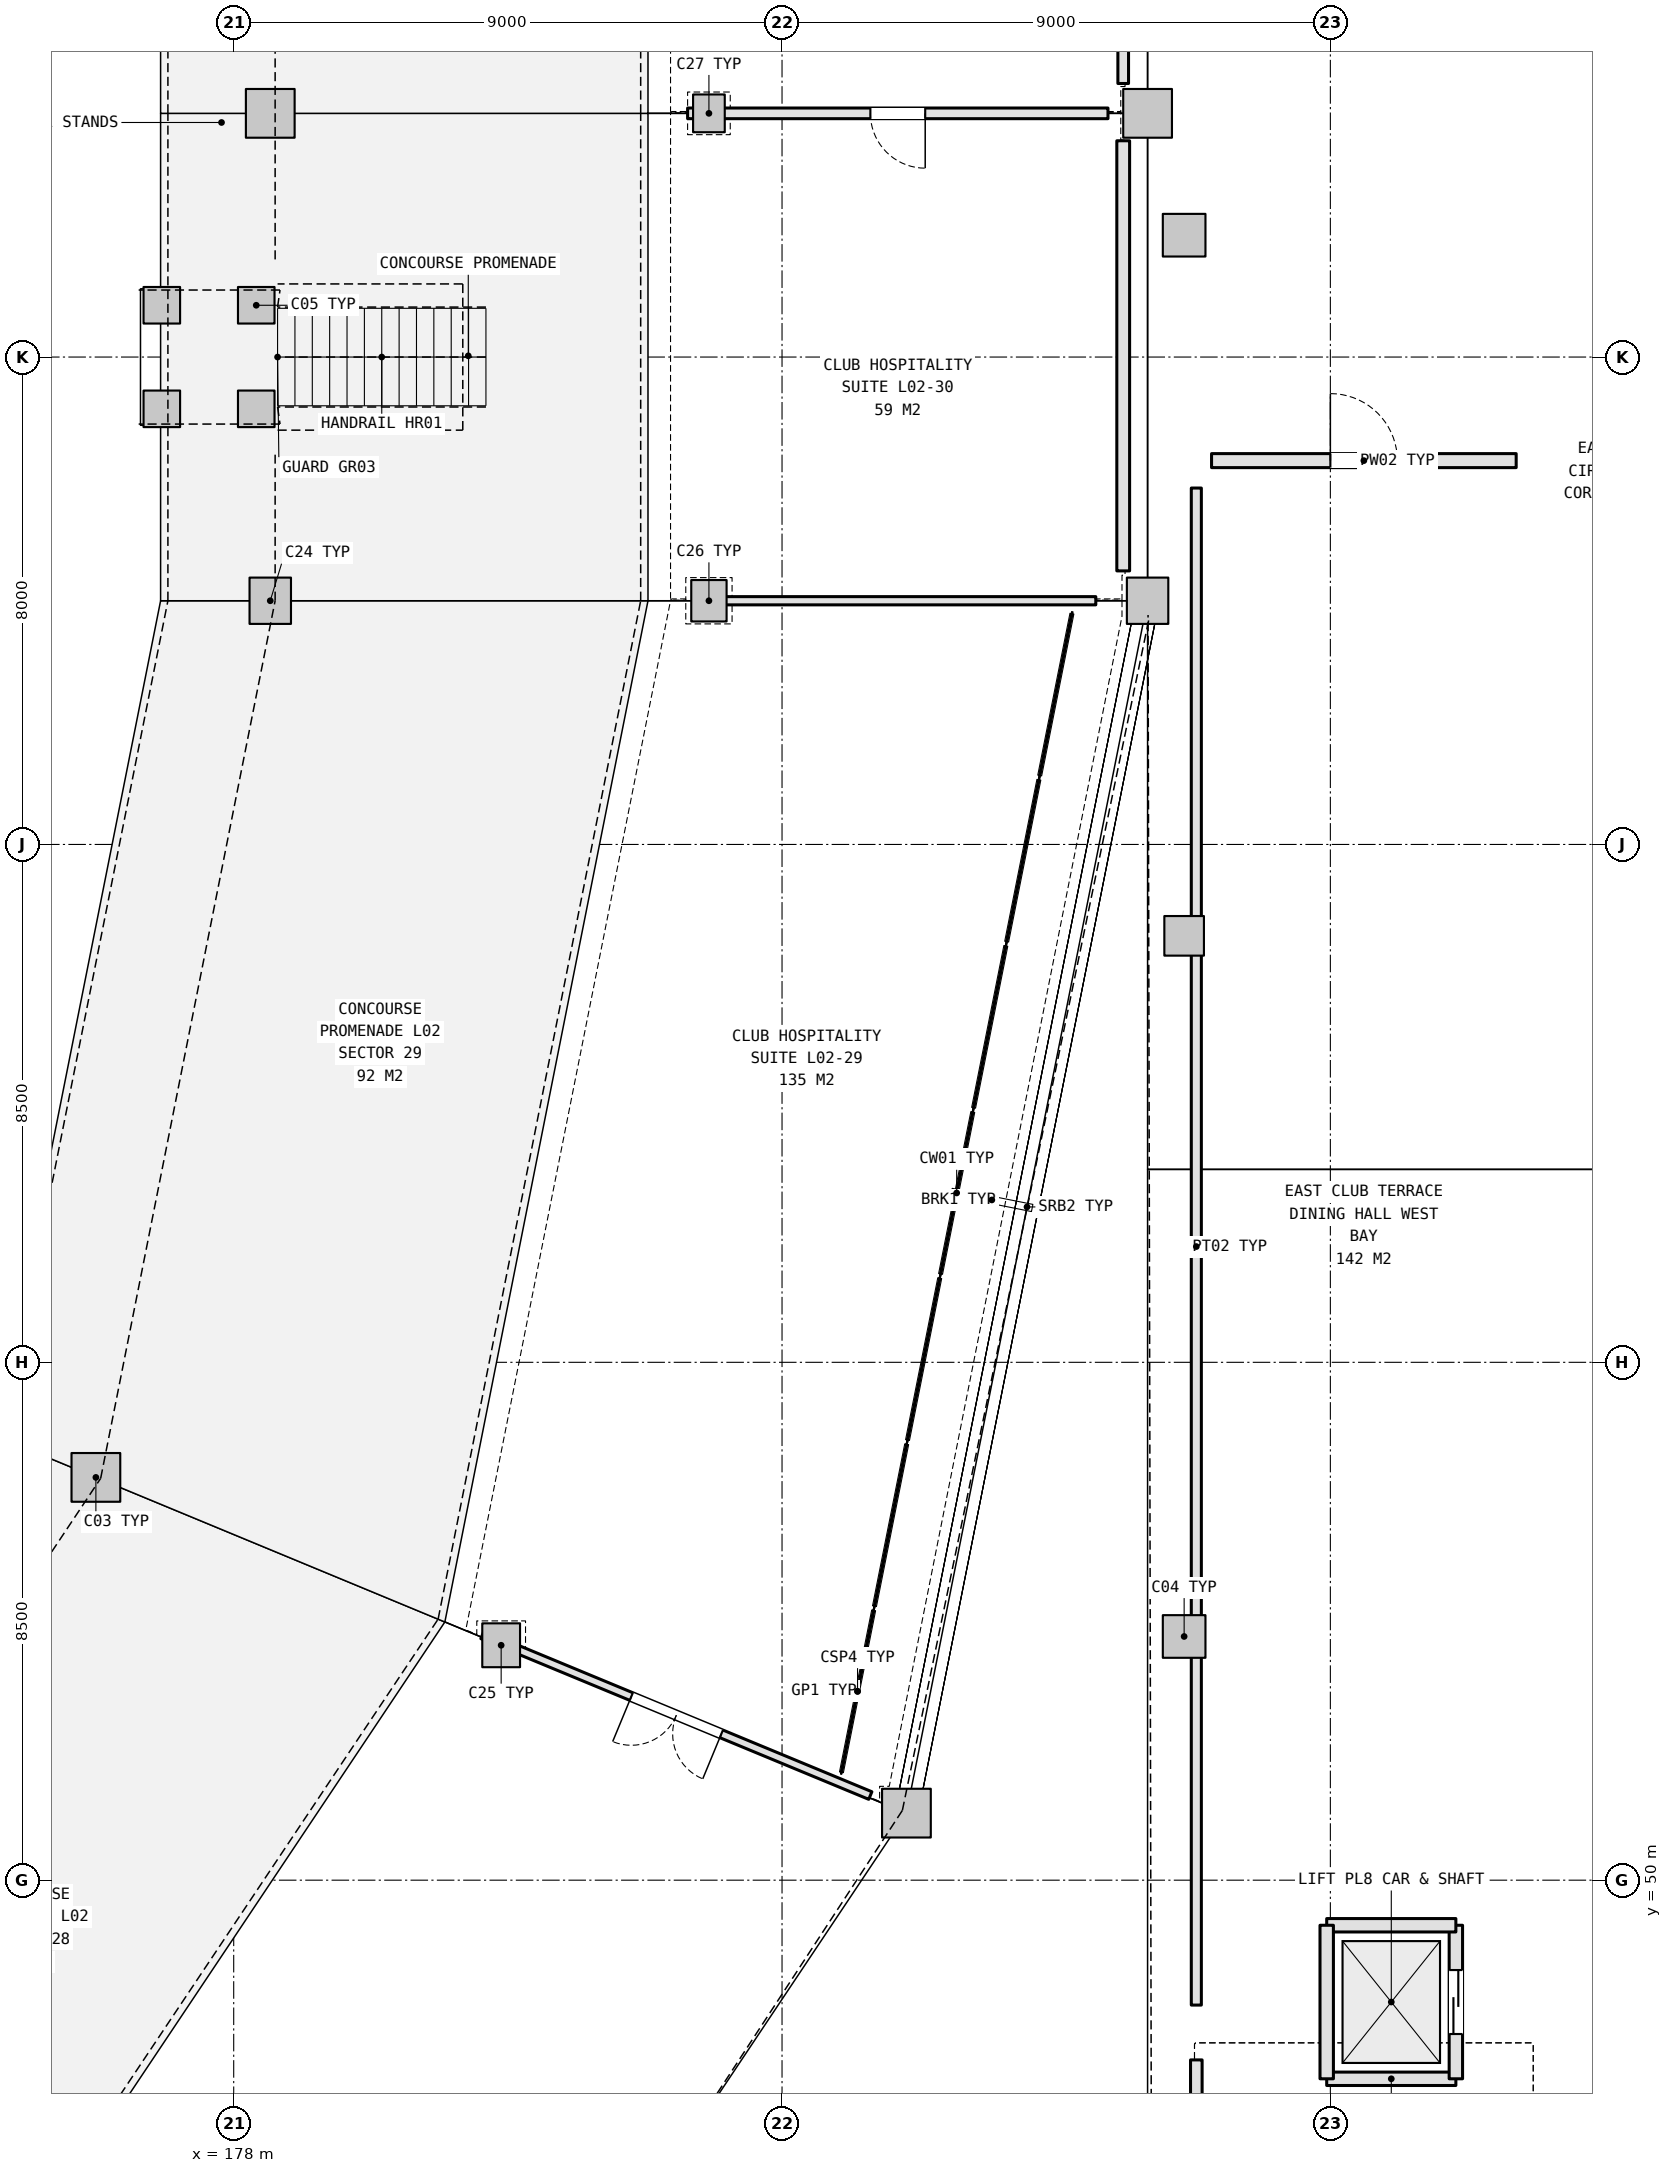
"""IFC4 building model, lengths in metres.
Left out: names, types, materials, properties, quantities, classifications, styles, units other than length and angle.
Written with IfcOpenShell. Run it as: python <this file> out.ifc"""

import sys

from ifc_helpers import new_model, si_unit, direction, frame, frame_2d, origin, origin_2d, place, context, subcontext, project, spatial, rectangle, extrude, element, fill, save


model = new_model("IFC4")
c1 = context("Model", 3, precision=1e-05, world=origin(), true_north=direction((0.0, 1.0)))
c2 = subcontext(c1, "Body", "Model", "MODEL_VIEW")
j1 = project(units=[si_unit("LENGTHUNIT", "METRE"), si_unit("PLANEANGLEUNIT", "RADIAN")], contexts=[c1])
p1 = place(None, origin())
s1 = spatial("IfcSite", under=j1, at=p1, CompositionType="ELEMENT")
p2 = place(p1, origin())
s2 = spatial("IfcBuilding", under=s1, at=p2, CompositionType="ELEMENT")
p3 = place(p2, frame((0.0, 0.0, 10.8)))
s3 = spatial("IfcBuildingStorey", under=s2, at=p3, CompositionType="ELEMENT", Elevation=10.8)
p4 = place(p3, frame((175.738, 56.611, 0.0), z_axis=(0.0, 0.0, 1.0), x_axis=(1.0, 0.0, 0.0)))
e1 = element("IfcColumn", 1, at=p4, inside=s3, PredefinedType="COLUMN", context=c2, shape_type="SweptSolid", body=[
    extrude(rectangle(XDim=0.8, YDim=0.8, at=origin_2d()), origin(), (0.0, 0.0, 1.0), 5.4),
])
p5 = place(p3, frame((182.39, 53.856, 0.0), z_axis=(0.0, 0.0, 1.0), x_axis=(1.0, 0.0, 0.0)))
e2 = element("IfcColumn", 2, at=p5, inside=s3, PredefinedType="COLUMN", context=c2, shape_type="SweptSolid", body=[
    extrude(rectangle(XDim=0.62, YDim=0.72, at=origin_2d()), origin(), (0.0, 0.0, 1.0), 5.4),
])
p6 = place(p3, frame((189.042, 51.1, 0.0), z_axis=(0.0, 0.0, 1.0), x_axis=(1.0, 0.0, 0.0)))
e3 = element("IfcColumn", 3, at=p6, inside=s3, PredefinedType="COLUMN", context=c2, shape_type="SweptSolid", body=[
    extrude(rectangle(XDim=0.8, YDim=0.8, at=origin_2d()), origin(), (0.0, 0.0, 1.0), 5.4),
])
p7 = place(p3, frame((178.6, 71.0, 0.0), z_axis=(0.0, 0.0, 1.0), x_axis=(1.0, 0.0, 0.0)))
e4 = element("IfcColumn", 4, at=p7, inside=s3, PredefinedType="COLUMN", context=c2, shape_type="SweptSolid", body=[
    extrude(rectangle(XDim=0.68, YDim=0.76, at=origin_2d()), origin(), (0.0, 0.0, 1.0), 5.4),
])
p8 = place(p3, frame((185.8, 71.0, 0.0), z_axis=(0.0, 0.0, 1.0), x_axis=(1.0, 0.0, 0.0)))
e5 = element("IfcColumn", 5, at=p8, inside=s3, PredefinedType="COLUMN", context=c2, shape_type="SweptSolid", body=[
    extrude(rectangle(XDim=0.58, YDim=0.68, at=origin_2d()), origin(), (0.0, 0.0, 1.0), 5.4),
])
p9 = place(p3, frame((193.0, 71.0, 0.0), z_axis=(0.0, 0.0, 1.0), x_axis=(1.0, 0.0, 0.0)))
e6 = element("IfcColumn", 6, at=p9, inside=s3, PredefinedType="COLUMN", context=c2, shape_type="SweptSolid", body=[
    extrude(rectangle(XDim=0.68, YDim=0.76, at=origin_2d()), origin(), (0.0, 0.0, 1.0), 5.4),
])
p10 = place(p3, frame((178.6, 79.0, 0.0), z_axis=(0.0, 0.0, 1.0), x_axis=(1.0, 0.0, 0.0)))
e7 = element("IfcColumn", 7, at=p10, inside=s3, PredefinedType="COLUMN", context=c2, shape_type="SweptSolid", body=[
    extrude(rectangle(XDim=0.8, YDim=0.8, at=origin_2d()), origin(), (0.0, 0.0, 1.0), 5.4),
])
p11 = place(p3, frame((185.8, 79.0, 0.0), z_axis=(0.0, 0.0, 1.0), x_axis=(1.0, 0.0, 0.0)))
e8 = element("IfcColumn", 8, at=p11, inside=s3, PredefinedType="COLUMN", context=c2, shape_type="SweptSolid", body=[
    extrude(rectangle(XDim=0.52, YDim=0.62, at=origin_2d()), origin(), (0.0, 0.0, 1.0), 5.4),
])
p12 = place(p3, frame((193.0, 79.0, 0.0), z_axis=(0.0, 0.0, 1.0), x_axis=(1.0, 0.0, 0.0)))
e9 = element("IfcColumn", 9, at=p12, inside=s3, PredefinedType="COLUMN", context=c2, shape_type="SweptSolid", body=[
    extrude(rectangle(XDim=0.8, YDim=0.8, at=origin_2d()), origin(), (0.0, 0.0, 1.0), 5.4),
])
p13 = place(p3, frame((193.6, 54.0, 0.0), z_axis=(0.0, 0.0, 1.0), x_axis=(1.0, 0.0, 0.0)))
e10 = element("IfcColumn", 10, at=p13, inside=s3, PredefinedType="COLUMN", context=c2, shape_type="SweptSolid", body=[
    extrude(rectangle(XDim=0.7, YDim=0.7, at=origin_2d()), origin(), (0.0, 0.0, 1.0), 5.4),
])
p14 = place(p3, frame((193.6, 65.5, 0.0), z_axis=(0.0, 0.0, 1.0), x_axis=(1.0, 0.0, 0.0)))
e11 = element("IfcColumn", 11, at=p14, inside=s3, PredefinedType="COLUMN", context=c2, shape_type="SweptSolid", body=[
    extrude(rectangle(XDim=0.65, YDim=0.65, at=origin_2d()), origin(), (0.0, 0.0, 1.0), 5.4),
])
p15 = place(p3, frame((193.6, 77.0, 0.0), z_axis=(0.0, 0.0, 1.0), x_axis=(1.0, 0.0, 0.0)))
e12 = element("IfcColumn", 12, at=p15, inside=s3, PredefinedType="COLUMN", context=c2, shape_type="SweptSolid", body=[
    extrude(rectangle(XDim=0.7, YDim=0.7, at=origin_2d()), origin(), (0.0, 0.0, 1.0), 5.4),
])
for number, where, z_axis, x_axis in (
    (13, (178.37, 75.85, 0.0), (0.0, 0.0, 1.0), (1.0, 0.0, 0.0)),
    (14, (176.82, 75.85, 0.0), (0.0, 0.0, 1.0), (1.0, 0.0, 0.0)),
    (15, (176.82, 74.15, 0.0), (0.0, 0.0, 1.0), (1.0, 0.0, 0.0)),
    (16, (178.37, 74.15, 0.0), (0.0, 0.0, 1.0), (1.0, 0.0, 0.0)),
):
    element("IfcColumn", number, at=place(p3, frame(where, z_axis=z_axis, x_axis=x_axis)), inside=s3, PredefinedType="COLUMN", context=c2, shape_type="SweptSolid", body=[
        extrude(rectangle(XDim=0.6, YDim=0.6, at=origin_2d()), origin(), (0.0, 0.0, 1.0), 2.04),
    ])
p16 = place(p3, frame((195.94, 46.74, 0.0), z_axis=(0.0, 0.0, 1.0), x_axis=(1.0, 0.0, 0.0)))
e17 = element("IfcWall", 17, at=p16, inside=s3, PredefinedType="SHEAR", context=c2, shape_type="SweptSolid", body=[
    extrude(rectangle(XDim=2.12, YDim=0.22, at=frame_2d((1.06, 0.0))), origin(), (0.0, 0.0, 1.0), 5.15),
])
p17 = place(p3, frame((198.06, 46.74, 0.0), z_axis=(0.0, 0.0, 1.0), x_axis=(0.0, 1.0, 0.0)))
e18 = element("IfcWall", 18, at=p17, inside=s3, PredefinedType="SHEAR", context=c2, shape_type="SweptSolid", body=[
    extrude(rectangle(XDim=2.52, YDim=0.22, at=frame_2d((1.26, 0.0))), origin(), (0.0, 0.0, 1.0), 5.15),
])
p18 = place(p17, frame((0.735, 0.0, 0.0)))
e19 = element("IfcOpeningElement", 19, at=p18, cuts=e18, PredefinedType="OPENING", context=c2, shape_type="SweptSolid", body=[
    extrude(rectangle(XDim=1.05, YDim=2.15, at=frame_2d((0.525, 1.075))), frame((0.0, 0.12, 0.0), z_axis=(0.0, -1.0, 0.0), x_axis=(1.0, 0.0, 0.0)), (0.0, 0.0, 1.0), 0.24),
])
p19 = place(p3, frame((198.06, 49.26, 0.0), z_axis=(0.0, 0.0, 1.0), x_axis=(-1.0, 0.0, 0.0)))
e20 = element("IfcWall", 20, at=p19, inside=s3, PredefinedType="SHEAR", context=c2, shape_type="SweptSolid", body=[
    extrude(rectangle(XDim=2.12, YDim=0.22, at=frame_2d((1.06, 0.0))), origin(), (0.0, 0.0, 1.0), 5.15),
])
p20 = place(p3, frame((195.94, 49.26, 0.0), z_axis=(0.0, 0.0, 1.0), x_axis=(0.0, -1.0, 0.0)))
e21 = element("IfcWall", 21, at=p20, inside=s3, PredefinedType="SHEAR", context=c2, shape_type="SweptSolid", body=[
    extrude(rectangle(XDim=2.52, YDim=0.22, at=frame_2d((1.26, 0.0))), origin(), (0.0, 0.0, 1.0), 5.15),
])
p21 = place(p3, frame((193.8, 19.75, 0.0), z_axis=(0.0, 0.0, 1.0), x_axis=(0.0, 1.0, 0.0)))
e22 = element("IfcWall", 22, at=p21, inside=s3, PredefinedType="PARTITIONING", context=c2, shape_type="SweptSolid", body=[
    extrude(rectangle(XDim=27.3, YDim=0.19, at=frame_2d((13.65, 0.0))), origin(), (0.0, 0.0, 1.0), 4.455),
])
p22 = place(p21, frame((13.25, 0.0, 0.0)))
e23 = element("IfcOpeningElement", 23, at=p22, cuts=e22, PredefinedType="OPENING", context=c2, shape_type="SweptSolid", body=[
    extrude(rectangle(XDim=1.6, YDim=2.2, at=frame_2d((0.8, 1.1))), frame((0.0, 0.105, 0.0), z_axis=(0.0, -1.0, 0.0), x_axis=(1.0, 0.0, 0.0)), (0.0, 0.0, 1.0), 0.21),
])
p23 = place(p3, frame((194.05, 73.3, 0.0), z_axis=(0.0, 0.0, 1.0), x_axis=(1.0, 0.0, 0.0)))
e24 = element("IfcWall", 24, at=p23, inside=s3, PredefinedType="PLUMBINGWALL", context=c2, shape_type="SweptSolid", body=[
    extrude(rectangle(XDim=5.0, YDim=0.23, at=frame_2d((2.5, 0.0))), origin(), (0.0, 0.0, 1.0), 5.12),
])
p24 = place(p23, frame((1.95, 0.0, 0.0)))
e25 = element("IfcOpeningElement", 25, at=p24, cuts=e24, PredefinedType="OPENING", context=c2, shape_type="SweptSolid", body=[
    extrude(rectangle(XDim=1.1, YDim=2.15, at=frame_2d((0.55, 1.075))), frame((0.0, 0.125, 0.0), z_axis=(0.0, -1.0, 0.0), x_axis=(1.0, 0.0, 0.0)), (0.0, 0.0, 1.0), 0.25),
])
p25 = place(p3, frame((193.8, 47.95, 0.0), z_axis=(0.0, 0.0, 1.0), x_axis=(0.0, 1.0, 0.0)))
e26 = element("IfcWall", 26, at=p25, inside=s3, PredefinedType="PARTITIONING", context=c2, shape_type="SweptSolid", body=[
    extrude(rectangle(XDim=24.9, YDim=0.165, at=frame_2d((12.45, 0.0))), origin(), (0.0, 0.0, 1.0), 4.455),
])
p26 = place(p3, frame((188.449, 51.389, 0.0), z_axis=(0.0, 0.0, 1.0), x_axis=(-0.923880834014, 0.382680290244, 0.0)))
e27 = element("IfcWall", 27, at=p26, inside=s3, PredefinedType="PARTITIONING", context=c2, shape_type="SweptSolid", body=[
    extrude(rectangle(XDim=6.892, YDim=0.135, at=frame_2d((3.446, 0.0))), origin(), (0.0, 0.0, 1.0), 4.255),
])
p27 = place(p26, frame((2.646, 0.0, 0.0)))
e28 = element("IfcOpeningElement", 28, at=p27, cuts=e27, PredefinedType="OPENING", context=c2, shape_type="SweptSolid", body=[
    extrude(rectangle(XDim=1.6, YDim=2.2, at=frame_2d((0.8, 1.1))), frame((0.0, 0.077, 0.0), z_axis=(0.0, -1.0, 0.0), x_axis=(1.0, 0.0, 0.0)), (0.0, 0.0, 1.0), 0.155),
])
p28 = place(p3, frame((185.65, 71.0, 0.0), z_axis=(0.0, 0.0, 1.0), x_axis=(1.0, 0.0, 0.0)))
e29 = element("IfcWall", 29, at=p28, inside=s3, PredefinedType="PARTITIONING", context=c2, shape_type="SweptSolid", body=[
    extrude(rectangle(XDim=6.5, YDim=0.135, at=frame_2d((3.25, 0.0))), origin(), (0.0, 0.0, 1.0), 4.285),
])
p29 = place(p3, frame((185.45, 79.0, 0.0), z_axis=(0.0, 0.0, 1.0), x_axis=(1.0, 0.0, 0.0)))
e30 = element("IfcWall", 30, at=p29, inside=s3, PredefinedType="PARTITIONING", context=c2, shape_type="SweptSolid", body=[
    extrude(rectangle(XDim=6.9, YDim=0.175, at=frame_2d((3.45, 0.0))), origin(), (0.0, 0.0, 1.0), 4.215),
])
p30 = place(p29, frame((3.0, 0.0, 0.0)))
e31 = element("IfcOpeningElement", 31, at=p30, cuts=e30, PredefinedType="OPENING", context=c2, shape_type="SweptSolid", body=[
    extrude(rectangle(XDim=0.9, YDim=2.1, at=frame_2d((0.45, 1.05))), frame((0.0, 0.097, 0.0), z_axis=(0.0, -1.0, 0.0), x_axis=(1.0, 0.0, 0.0)), (0.0, 0.0, 1.0), 0.195),
])
p31 = place(p3, frame((192.6, 78.55, 0.0), z_axis=(0.0, 0.0, 1.0), x_axis=(0.0, -1.0, 0.0)))
e32 = element("IfcWall", 32, at=p31, inside=s3, PredefinedType="PLUMBINGWALL", context=c2, shape_type="SweptSolid", body=[
    extrude(rectangle(XDim=7.06, YDim=0.21, at=frame_2d((3.53, 0.0))), origin(), (0.0, 0.0, 1.0), 4.215),
])
p32 = place(p3, frame((192.6, 86.55, 0.0), z_axis=(0.0, 0.0, 1.0), x_axis=(0.0, -1.0, 0.0)))
e33 = element("IfcWall", 33, at=p32, inside=s3, PredefinedType="PARTITIONING", context=c2, shape_type="SweptSolid", body=[
    extrude(rectangle(XDim=7.06, YDim=0.175, at=frame_2d((3.53, 0.0))), origin(), (0.0, 0.0, 1.0), 5.12),
])
p33 = place(p18, origin())
e34 = element("IfcDoor", 34, at=p33, inside=s3, OperationType="DOUBLE_DOOR_SLIDING", PredefinedType="DOOR", context=c2, shape_type="SweptSolid", body=[
    extrude(rectangle(XDim=1.05, YDim=2.15, at=frame_2d((0.525, 1.075))), frame((0.0, 0.025, 0.0), z_axis=(0.0, -1.0, 0.0), x_axis=(1.0, 0.0, 0.0)), (0.0, 0.0, 1.0), 0.05),
])
fill(e19, e34)
p34 = place(p24, origin())
e35 = element("IfcDoor", 35, at=p34, inside=s3, OperationType="SINGLE_SWING_LEFT", PredefinedType="DOOR", context=c2, shape_type="SweptSolid", body=[
    extrude(rectangle(XDim=1.1, YDim=2.15, at=frame_2d((0.55, 1.075))), frame((0.0, 0.025, 0.0), z_axis=(0.0, -1.0, 0.0), x_axis=(1.0, 0.0, 0.0)), (0.0, 0.0, 1.0), 0.05),
])
fill(e25, e35)
p35 = place(p27, origin())
e36 = element("IfcDoor", 36, at=p35, inside=s3, OperationType="DOUBLE_DOOR_SINGLE_SWING", PredefinedType="DOOR", context=c2, shape_type="SweptSolid", body=[
    extrude(rectangle(XDim=1.6, YDim=2.2, at=frame_2d((0.8, 1.1))), frame((0.0, 0.025, 0.0), z_axis=(0.0, -1.0, 0.0), x_axis=(1.0, 0.0, 0.0)), (0.0, 0.0, 1.0), 0.05),
])
fill(e28, e36)
p36 = place(p30, frame((0.9, 0.0, 0.0), z_axis=(0.0, 0.0, 1.0), x_axis=(-1.0, 0.0, 0.0)))
e37 = element("IfcDoor", 37, at=p36, inside=s3, OperationType="SINGLE_SWING_RIGHT", PredefinedType="DOOR", context=c2, shape_type="SweptSolid", body=[
    extrude(rectangle(XDim=0.9, YDim=2.1, at=frame_2d((0.45, 1.05))), frame((0.0, 0.025, 0.0), z_axis=(0.0, -1.0, 0.0), x_axis=(1.0, 0.0, 0.0)), (0.0, 0.0, 1.0), 0.05),
])
fill(e31, e37)
save(model, sys.argv[1])
